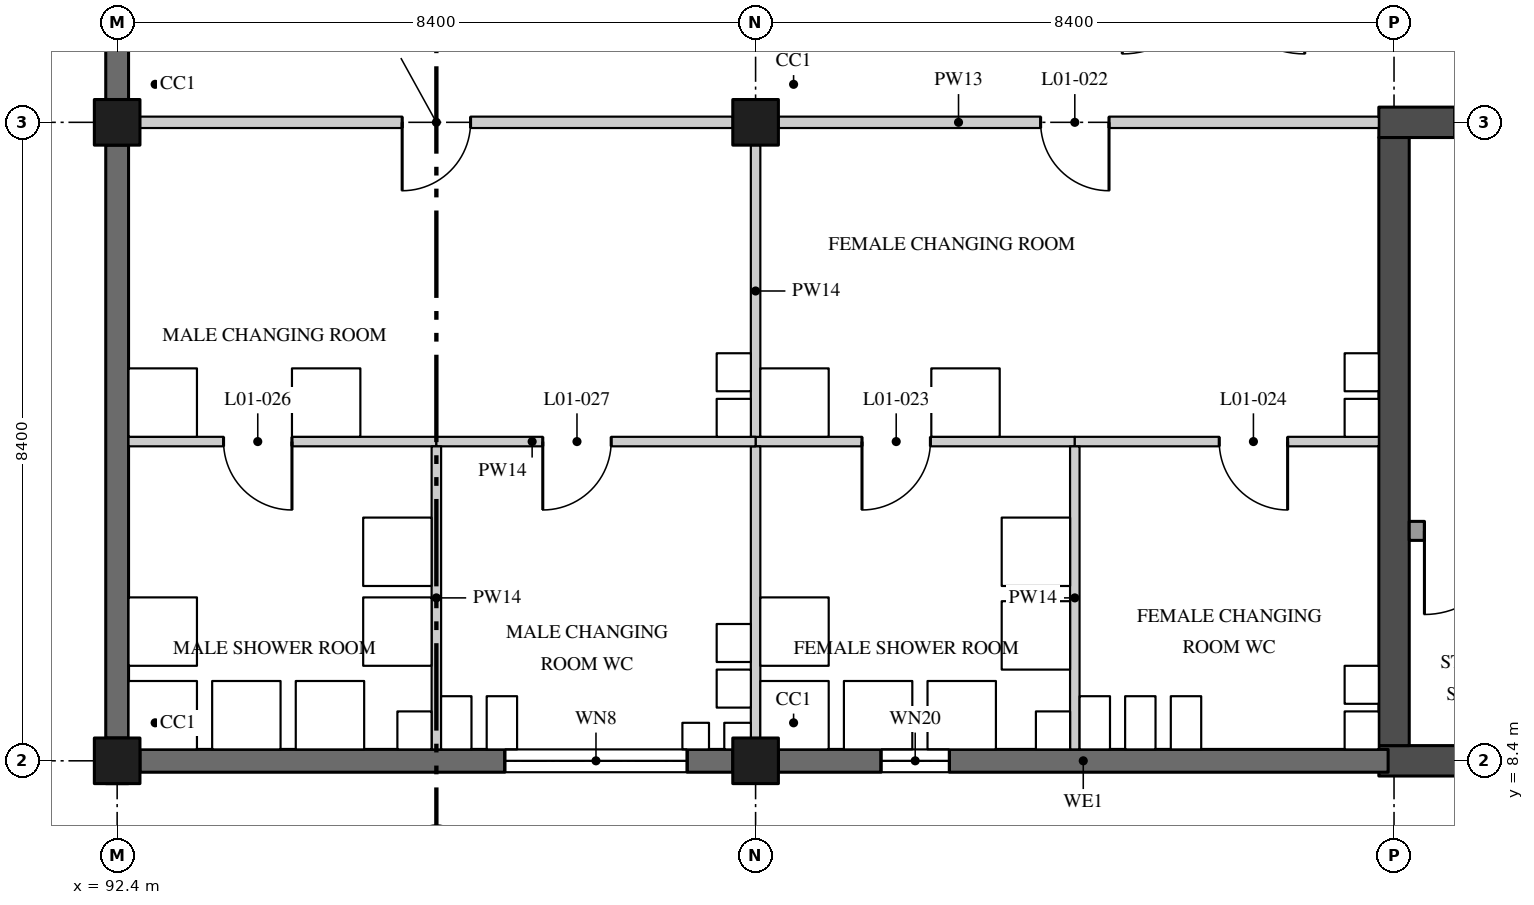
"""IFC4 building model, lengths in metres.
Left out: names, types, materials, properties, quantities, classifications, styles, units other than length and angle.
Written with IfcOpenShell. Run it as: python <this file> out.ifc"""

import sys

from ifc_helpers import new_model, si_unit, direction, frame, frame_2d, origin, origin_2d, place, context, subcontext, project, spatial, polyline, rectangle, outline, extrude, element, fill, save


model = new_model("IFC4")
c1 = context("Model", 3, precision=1e-05, world=origin(), true_north=direction((0.0, 1.0)))
c2 = subcontext(c1, "Body", "Model", "MODEL_VIEW")
j1 = project(units=[si_unit("LENGTHUNIT", "METRE"), si_unit("PLANEANGLEUNIT", "RADIAN")], contexts=[c1])
p1 = place(None, origin())
s1 = spatial("IfcSite", under=j1, at=p1, CompositionType="ELEMENT")
p2 = place(p1, origin())
s2 = spatial("IfcBuilding", under=s1, at=p2, CompositionType="ELEMENT")
p3 = place(p2, frame((0.0, 0.0, 5.4)))
s3 = spatial("IfcBuildingStorey", under=s2, at=p3, CompositionType="ELEMENT", Elevation=5.4)
for number, where, z_axis, x_axis in (
    (1, (92.4, 8.4, 0.0), (0.0, 0.0, 1.0), (1.0, 0.0, 0.0)),
    (2, (92.4, 16.8, 0.0), (0.0, 0.0, 1.0), (1.0, 0.0, 0.0)),
    (3, (100.8, 8.4, 0.0), (0.0, 0.0, 1.0), (1.0, 0.0, 0.0)),
    (4, (100.8, 16.8, 0.0), (0.0, 0.0, 1.0), (1.0, 0.0, 0.0)),
):
    element("IfcColumn", number, at=place(p3, frame(where, z_axis=z_axis, x_axis=x_axis)), inside=s3, PredefinedType="COLUMN", context=c2, shape_type="SweptSolid", body=[
        extrude(rectangle(XDim=0.6, YDim=0.6, at=origin_2d()), origin(), (0.0, 0.0, 1.0), 3.0),
    ])
p4 = place(p3, frame((109.0, 8.4, 0.0), z_axis=(0.0, 0.0, 1.0), x_axis=(1.0, 0.0, 0.0)))
e5 = element("IfcWall", 5, at=p4, inside=s3, PredefinedType="SHEAR", context=c2, shape_type="SweptSolid", body=[
    extrude(rectangle(XDim=8.8, YDim=0.4, at=frame_2d((4.4, 0.0))), origin(), (0.0, 0.0, 1.0), 3.0),
])
p5 = place(p3, frame((109.0, 16.8, 0.0), z_axis=(0.0, 0.0, 1.0), x_axis=(1.0, 0.0, 0.0)))
e6 = element("IfcWall", 6, at=p5, inside=s3, PredefinedType="SHEAR", context=c2, shape_type="SweptSolid", body=[
    extrude(rectangle(XDim=8.8, YDim=0.4, at=frame_2d((4.4, 0.0))), origin(), (0.0, 0.0, 1.0), 3.0),
])
p6 = place(p5, frame((1.0, 0.0, 0.0)))
e7 = element("IfcOpeningElement", 7, at=p6, cuts=e6, PredefinedType="OPENING", context=c2, shape_type="SweptSolid", body=[
    extrude(rectangle(XDim=1.2, YDim=2.1, at=frame_2d((0.6, 1.05))), frame((0.0, 0.21, 0.0), z_axis=(0.0, -1.0, 0.0), x_axis=(1.0, 0.0, 0.0)), (0.0, 0.0, 1.0), 0.42),
])
p7 = place(p3, frame((109.2, 8.6, 0.0), z_axis=(0.0, 0.0, 1.0), x_axis=(0.0, 1.0, 0.0)))
e8 = element("IfcWall", 8, at=p7, inside=s3, PredefinedType="SHEAR", context=c2, shape_type="SweptSolid", body=[
    extrude(rectangle(XDim=8.0, YDim=0.4, at=frame_2d((4.0, 0.0))), origin(), (0.0, 0.0, 1.0), 3.0),
])
p8 = place(p3, frame((109.4, 11.425, 0.0), z_axis=(0.0, 0.0, 1.0), x_axis=(1.0, 0.0, 0.0)))
e9 = element("IfcWall", 9, at=p8, inside=s3, PredefinedType="SOLIDWALL", context=c2, shape_type="SweptSolid", body=[
    extrude(rectangle(XDim=8.0, YDim=0.25, at=frame_2d((4.0, 0.0))), origin(), (0.0, 0.0, 1.0), 3.0),
])
p9 = place(p8, frame((0.2, 0.0, 0.0)))
e10 = element("IfcOpeningElement", 10, at=p9, cuts=e9, PredefinedType="OPENING", context=c2, shape_type="SweptSolid", body=[
    extrude(rectangle(XDim=1.1, YDim=2.1, at=frame_2d((0.55, 1.05))), frame((0.0, 0.135, 0.0), z_axis=(0.0, -1.0, 0.0), x_axis=(1.0, 0.0, 0.0)), (0.0, 0.0, 1.0), 0.27),
])
p10 = place(p3, frame((101.1, 16.8, 0.0), z_axis=(0.0, 0.0, 1.0), x_axis=(1.0, 0.0, 0.0)))
e11 = element("IfcWall", 11, at=p10, inside=s3, PredefinedType="PARTITIONING", context=c2, shape_type="SweptSolid", body=[
    extrude(rectangle(XDim=7.9, YDim=0.15, at=frame_2d((3.95, 0.0))), origin(), (0.0, 0.0, 1.0), 4.37),
])
p11 = place(p10, frame((3.45, 0.0, 0.0)))
e12 = element("IfcOpeningElement", 12, at=p11, cuts=e11, PredefinedType="OPENING", context=c2, shape_type="SweptSolid", body=[
    extrude(rectangle(XDim=0.9, YDim=2.1, at=frame_2d((0.45, 1.05))), frame((0.0, 0.085, 0.0), z_axis=(0.0, -1.0, 0.0), x_axis=(1.0, 0.0, 0.0)), (0.0, 0.0, 1.0), 0.17),
])
p12 = place(p3, frame((92.7, 16.8, 0.0), z_axis=(0.0, 0.0, 1.0), x_axis=(1.0, 0.0, 0.0)))
e13 = element("IfcWall", 13, at=p12, inside=s3, PredefinedType="PARTITIONING", context=c2, shape_type="SweptSolid", body=[
    extrude(rectangle(XDim=7.8, YDim=0.15, at=frame_2d((3.9, 0.0))), origin(), (0.0, 0.0, 1.0), 4.37),
])
p13 = place(p12, frame((3.45, 0.0, 0.0)))
e14 = element("IfcOpeningElement", 14, at=p13, cuts=e13, PredefinedType="OPENING", context=c2, shape_type="SweptSolid", body=[
    extrude(rectangle(XDim=0.9, YDim=2.1, at=frame_2d((0.45, 1.05))), frame((0.0, 0.085, 0.0), z_axis=(0.0, -1.0, 0.0), x_axis=(1.0, 0.0, 0.0)), (0.0, 0.0, 1.0), 0.17),
])
p14 = place(p3, frame((100.8, 12.6, 0.0), z_axis=(0.0, 0.0, 1.0), x_axis=(1.0, 0.0, 0.0)))
e15 = element("IfcWall", 15, at=p14, inside=s3, PredefinedType="PARTITIONING", context=c2, shape_type="SweptSolid", body=[
    extrude(rectangle(XDim=4.2, YDim=0.125, at=frame_2d((2.1, 0.0))), origin(), (0.0, 0.0, 1.0), 4.37),
])
p15 = place(p14, frame((1.4, 0.0, 0.0)))
e16 = element("IfcOpeningElement", 16, at=p15, cuts=e15, PredefinedType="OPENING", context=c2, shape_type="SweptSolid", body=[
    extrude(rectangle(XDim=0.9, YDim=2.1, at=frame_2d((0.45, 1.05))), frame((0.0, 0.073, 0.0), z_axis=(0.0, -1.0, 0.0), x_axis=(1.0, 0.0, 0.0)), (0.0, 0.0, 1.0), 0.145),
])
p16 = place(p3, frame((105.0, 12.6, 0.0), z_axis=(0.0, 0.0, 1.0), x_axis=(1.0, 0.0, 0.0)))
e17 = element("IfcWall", 17, at=p16, inside=s3, PredefinedType="PARTITIONING", context=c2, shape_type="SweptSolid", body=[
    extrude(rectangle(XDim=4.0, YDim=0.125, at=frame_2d((2.0, 0.0))), origin(), (0.0, 0.0, 1.0), 4.37),
])
p17 = place(p16, frame((1.9, 0.0, 0.0)))
e18 = element("IfcOpeningElement", 18, at=p17, cuts=e17, PredefinedType="OPENING", context=c2, shape_type="SweptSolid", body=[
    extrude(rectangle(XDim=0.9, YDim=2.1, at=frame_2d((0.45, 1.05))), frame((0.0, 0.073, 0.0), z_axis=(0.0, -1.0, 0.0), x_axis=(1.0, 0.0, 0.0)), (0.0, 0.0, 1.0), 0.145),
])
p18 = place(p3, frame((100.8, 12.662, 0.0), z_axis=(0.0, 0.0, 1.0), x_axis=(0.0, 1.0, 0.0)))
e19 = element("IfcWall", 19, at=p18, inside=s3, PredefinedType="PARTITIONING", context=c2, shape_type="SweptSolid", body=[
    extrude(rectangle(XDim=3.838, YDim=0.125, at=frame_2d((1.919, 0.0))), origin(), (0.0, 0.0, 1.0), 2.975),
])
p19 = place(p3, frame((105.0, 8.55, 0.0), z_axis=(0.0, 0.0, 1.0), x_axis=(0.0, 1.0, 0.0)))
e20 = element("IfcWall", 20, at=p19, inside=s3, PredefinedType="PARTITIONING", context=c2, shape_type="SweptSolid", body=[
    extrude(rectangle(XDim=3.987, YDim=0.125, at=frame_2d((1.994, 0.0))), origin(), (0.0, 0.0, 1.0), 4.37),
])
p20 = place(p3, frame((100.8, 8.7, 0.0), z_axis=(0.0, 0.0, 1.0), x_axis=(0.0, 1.0, 0.0)))
e21 = element("IfcWall", 21, at=p20, inside=s3, PredefinedType="PARTITIONING", context=c2, shape_type="SweptSolid", body=[
    extrude(rectangle(XDim=3.837, YDim=0.125, at=frame_2d((1.918, 0.0))), origin(), (0.0, 0.0, 1.0), 2.975),
])
p21 = place(p3, frame((92.55, 12.6, 0.0), z_axis=(0.0, 0.0, 1.0), x_axis=(1.0, 0.0, 0.0)))
e22 = element("IfcWall", 22, at=p21, inside=s3, PredefinedType="PARTITIONING", context=c2, shape_type="SweptSolid", body=[
    extrude(rectangle(XDim=4.05, YDim=0.125, at=frame_2d((2.025, 0.0))), origin(), (0.0, 0.0, 1.0), 4.37),
])
p22 = place(p21, frame((1.25, 0.0, 0.0)))
e23 = element("IfcOpeningElement", 23, at=p22, cuts=e22, PredefinedType="OPENING", context=c2, shape_type="SweptSolid", body=[
    extrude(rectangle(XDim=0.9, YDim=2.1, at=frame_2d((0.45, 1.05))), frame((0.0, 0.073, 0.0), z_axis=(0.0, -1.0, 0.0), x_axis=(1.0, 0.0, 0.0)), (0.0, 0.0, 1.0), 0.145),
])
p23 = place(p3, frame((96.6, 12.6, 0.0), z_axis=(0.0, 0.0, 1.0), x_axis=(1.0, 0.0, 0.0)))
e24 = element("IfcWall", 24, at=p23, inside=s3, PredefinedType="PARTITIONING", context=c2, shape_type="SweptSolid", body=[
    extrude(rectangle(XDim=4.2, YDim=0.125, at=frame_2d((2.1, 0.0))), origin(), (0.0, 0.0, 1.0), 4.37),
])
p24 = place(p23, frame((1.4, 0.0, 0.0)))
e25 = element("IfcOpeningElement", 25, at=p24, cuts=e24, PredefinedType="OPENING", context=c2, shape_type="SweptSolid", body=[
    extrude(rectangle(XDim=0.9, YDim=2.1, at=frame_2d((0.45, 1.05))), frame((0.0, 0.073, 0.0), z_axis=(0.0, -1.0, 0.0), x_axis=(1.0, 0.0, 0.0)), (0.0, 0.0, 1.0), 0.145),
])
p25 = place(p3, frame((96.6, 8.55, 0.0), z_axis=(0.0, 0.0, 1.0), x_axis=(0.0, 1.0, 0.0)))
e26 = element("IfcWall", 26, at=p25, inside=s3, PredefinedType="PARTITIONING", context=c2, shape_type="SweptSolid", body=[
    extrude(rectangle(XDim=3.987, YDim=0.125, at=frame_2d((1.994, 0.0))), origin(), (0.0, 0.0, 1.0), 4.37),
])
p26 = place(p3, frame((92.4, 17.1, 3.0), z_axis=(0.0, 0.0, 1.0), x_axis=(0.0, -1.0, 0.0)))
e27 = element("IfcWall", 27, at=p26, inside=s3, PredefinedType="SOLIDWALL", context=c2, shape_type="SweptSolid", body=[
    extrude(rectangle(XDim=0.6, YDim=0.3, at=frame_2d((0.3, 0.0))), origin(), (0.0, 0.0, 1.0), 1.5),
])
p27 = place(p3, frame((92.4, 25.0, 0.0), z_axis=(0.0, 0.0, 1.0), x_axis=(0.0, -1.0, 0.0)))
e28 = element("IfcWall", 28, at=p27, inside=s3, PredefinedType="SOLIDWALL", context=c2, shape_type="SweptSolid", body=[
    extrude(rectangle(XDim=7.9, YDim=0.3, at=frame_2d((3.95, 0.0))), origin(), (0.0, 0.0, 1.0), 2.975),
])
p28 = place(p3, frame((92.4, 8.7, 3.0), z_axis=(0.0, 0.0, 1.0), x_axis=(0.0, -1.0, 0.0)))
e29 = element("IfcWall", 29, at=p28, inside=s3, PredefinedType="SOLIDWALL", context=c2, shape_type="SweptSolid", body=[
    extrude(rectangle(XDim=0.6, YDim=0.3, at=frame_2d((0.3, 0.0))), origin(), (0.0, 0.0, 1.0), 1.5),
])
p29 = place(p3, frame((92.4, 16.5, 0.0), z_axis=(0.0, 0.0, 1.0), x_axis=(0.0, -1.0, 0.0)))
e30 = element("IfcWall", 30, at=p29, inside=s3, PredefinedType="SOLIDWALL", context=c2, shape_type="SweptSolid", body=[
    extrude(rectangle(XDim=7.8, YDim=0.3, at=frame_2d((3.9, 0.0))), origin(), (0.0, 0.0, 1.0), 2.975),
])
p30 = place(p3, frame((100.5, 8.4, 3.0), z_axis=(0.0, 0.0, 1.0), x_axis=(1.0, 0.0, 0.0)))
e31 = element("IfcWall", 31, at=p30, inside=s3, PredefinedType="SOLIDWALL", context=c2, shape_type="SweptSolid", body=[
    extrude(outline(polyline([(0.0, 0.0), (0.6, 0.0), (0.6, 1.0), (0.0, 1.0), (0.0, 0.0)])), frame((0.0, 0.15, 0.0), z_axis=(0.0, -1.0, 0.0), x_axis=(1.0, 0.0, 0.0)), (0.0, 0.0, 1.0), 0.3),
])
p31 = place(p3, frame((92.7, 8.4, 0.0), z_axis=(0.0, 0.0, 1.0), x_axis=(1.0, 0.0, 0.0)))
e32 = element("IfcWall", 32, at=p31, inside=s3, PredefinedType="SOLIDWALL", context=c2, shape_type="SweptSolid", body=[
    extrude(outline(polyline([(0.0, 0.0), (7.8, 0.0), (7.8, 4.0), (0.0, 4.0), (0.0, 0.0)])), frame((0.0, 0.15, 0.0), z_axis=(0.0, -1.0, 0.0), x_axis=(1.0, 0.0, 0.0)), (0.0, 0.0, 1.0), 0.3),
])
p32 = place(p31, frame((4.8, 0.0, 0.6)))
e33 = element("IfcOpeningElement", 33, at=p32, cuts=e32, PredefinedType="OPENING", context=c2, shape_type="SweptSolid", body=[
    extrude(rectangle(XDim=2.4, YDim=2.1, at=frame_2d((1.2, 1.05))), frame((0.0, 0.16, 0.0), z_axis=(0.0, -1.0, 0.0), x_axis=(1.0, 0.0, 0.0)), (0.0, 0.0, 1.0), 0.32),
])
p33 = place(p3, frame((101.1, 8.4, 0.0), z_axis=(0.0, 0.0, 1.0), x_axis=(1.0, 0.0, 0.0)))
e34 = element("IfcWall", 34, at=p33, inside=s3, PredefinedType="SOLIDWALL", context=c2, shape_type="SweptSolid", body=[
    extrude(outline(polyline([(0.0, 0.0), (8.022, 0.0), (8.022, 4.0), (7.9, 4.0), (0.0, 4.0), (0.0, 0.0)])), frame((0.0, 0.15, 0.0), z_axis=(0.0, -1.0, 0.0), x_axis=(1.0, 0.0, 0.0)), (0.0, 0.0, 1.0), 0.3),
])
p34 = place(p33, frame((1.35, 0.0, 1.5)))
e35 = element("IfcOpeningElement", 35, at=p34, cuts=e34, PredefinedType="OPENING", context=c2, shape_type="SweptSolid", body=[
    extrude(rectangle(XDim=0.9, YDim=1.2, at=frame_2d((0.45, 0.6))), frame((0.0, 0.16, 0.0), z_axis=(0.0, -1.0, 0.0), x_axis=(1.0, 0.0, 0.0)), (0.0, 0.0, 1.0), 0.32),
])
p35 = place(p9, frame((1.1, 0.0, 0.0), z_axis=(0.0, 0.0, 1.0), x_axis=(-1.0, 0.0, 0.0)))
e36 = element("IfcDoor", 36, at=p35, inside=s3, OperationType="SINGLE_SWING_LEFT", PredefinedType="DOOR", context=c2, shape_type="SweptSolid", body=[
    extrude(rectangle(XDim=1.1, YDim=2.1, at=frame_2d((0.55, 1.05))), frame((0.0, 0.035, 0.0), z_axis=(0.0, -1.0, 0.0), x_axis=(1.0, 0.0, 0.0)), (0.0, 0.0, 1.0), 0.07),
])
fill(e10, e36)
p36 = place(p11, frame((0.9, 0.0, 0.0), z_axis=(0.0, 0.0, 1.0), x_axis=(-1.0, 0.0, 0.0)))
e37 = element("IfcDoor", 37, at=p36, inside=s3, OperationType="SINGLE_SWING_RIGHT", PredefinedType="DOOR", context=c2, shape_type="SweptSolid", body=[
    extrude(rectangle(XDim=0.9, YDim=2.1, at=frame_2d((0.45, 1.05))), frame((0.0, 0.025, 0.0), z_axis=(0.0, -1.0, 0.0), x_axis=(1.0, 0.0, 0.0)), (0.0, 0.0, 1.0), 0.05),
])
fill(e12, e37)
p37 = place(p15, frame((0.9, 0.0, 0.0), z_axis=(0.0, 0.0, 1.0), x_axis=(-1.0, 0.0, 0.0)))
e38 = element("IfcDoor", 38, at=p37, inside=s3, OperationType="SINGLE_SWING_LEFT", PredefinedType="DOOR", context=c2, shape_type="SweptSolid", body=[
    extrude(rectangle(XDim=0.9, YDim=2.1, at=frame_2d((0.45, 1.05))), frame((0.0, 0.02, 0.0), z_axis=(0.0, -1.0, 0.0), x_axis=(1.0, 0.0, 0.0)), (0.0, 0.0, 1.0), 0.04),
])
fill(e16, e38)
p38 = place(p17, frame((0.9, 0.0, 0.0), z_axis=(0.0, 0.0, 1.0), x_axis=(-1.0, 0.0, 0.0)))
e39 = element("IfcDoor", 39, at=p38, inside=s3, OperationType="SINGLE_SWING_RIGHT", PredefinedType="DOOR", context=c2, shape_type="SweptSolid", body=[
    extrude(rectangle(XDim=0.9, YDim=2.1, at=frame_2d((0.45, 1.05))), frame((0.0, 0.02, 0.0), z_axis=(0.0, -1.0, 0.0), x_axis=(1.0, 0.0, 0.0)), (0.0, 0.0, 1.0), 0.04),
])
fill(e18, e39)
p39 = place(p13, frame((0.9, 0.0, 0.0), z_axis=(0.0, 0.0, 1.0), x_axis=(-1.0, 0.0, 0.0)))
e40 = element("IfcDoor", 40, at=p39, inside=s3, OperationType="SINGLE_SWING_LEFT", PredefinedType="DOOR", context=c2, shape_type="SweptSolid", body=[
    extrude(rectangle(XDim=0.9, YDim=2.1, at=frame_2d((0.45, 1.05))), frame((0.0, 0.025, 0.0), z_axis=(0.0, -1.0, 0.0), x_axis=(1.0, 0.0, 0.0)), (0.0, 0.0, 1.0), 0.05),
])
fill(e14, e40)
p40 = place(p22, frame((0.9, 0.0, 0.0), z_axis=(0.0, 0.0, 1.0), x_axis=(-1.0, 0.0, 0.0)))
e41 = element("IfcDoor", 41, at=p40, inside=s3, OperationType="SINGLE_SWING_RIGHT", PredefinedType="DOOR", context=c2, shape_type="SweptSolid", body=[
    extrude(rectangle(XDim=0.9, YDim=2.1, at=frame_2d((0.45, 1.05))), frame((0.0, 0.02, 0.0), z_axis=(0.0, -1.0, 0.0), x_axis=(1.0, 0.0, 0.0)), (0.0, 0.0, 1.0), 0.04),
])
fill(e23, e41)
p41 = place(p24, frame((0.9, 0.0, 0.0), z_axis=(0.0, 0.0, 1.0), x_axis=(-1.0, 0.0, 0.0)))
e42 = element("IfcDoor", 42, at=p41, inside=s3, OperationType="SINGLE_SWING_LEFT", PredefinedType="DOOR", context=c2, shape_type="SweptSolid", body=[
    extrude(rectangle(XDim=0.9, YDim=2.1, at=frame_2d((0.45, 1.05))), frame((0.0, 0.02, 0.0), z_axis=(0.0, -1.0, 0.0), x_axis=(1.0, 0.0, 0.0)), (0.0, 0.0, 1.0), 0.04),
])
fill(e25, e42)
p42 = place(p32, origin())
e43 = element("IfcWindow", 43, at=p42, inside=s3, PartitioningType="SINGLE_PANEL", PredefinedType="WINDOW", context=c2, shape_type="SweptSolid", body=[
    extrude(rectangle(XDim=2.4, YDim=2.1, at=frame_2d((1.2, 1.05))), frame((0.0, 0.06, 0.0), z_axis=(0.0, -1.0, 0.0), x_axis=(1.0, 0.0, 0.0)), (0.0, 0.0, 1.0), 0.12),
])
fill(e33, e43)
p43 = place(p34, origin())
e44 = element("IfcWindow", 44, at=p43, inside=s3, PartitioningType="SINGLE_PANEL", PredefinedType="WINDOW", context=c2, shape_type="SweptSolid", body=[
    extrude(rectangle(XDim=0.9, YDim=1.2, at=frame_2d((0.45, 0.6))), frame((0.0, 0.04, 0.0), z_axis=(0.0, -1.0, 0.0), x_axis=(1.0, 0.0, 0.0)), (0.0, 0.0, 1.0), 0.08),
])
fill(e35, e44)
save(model, sys.argv[1])
